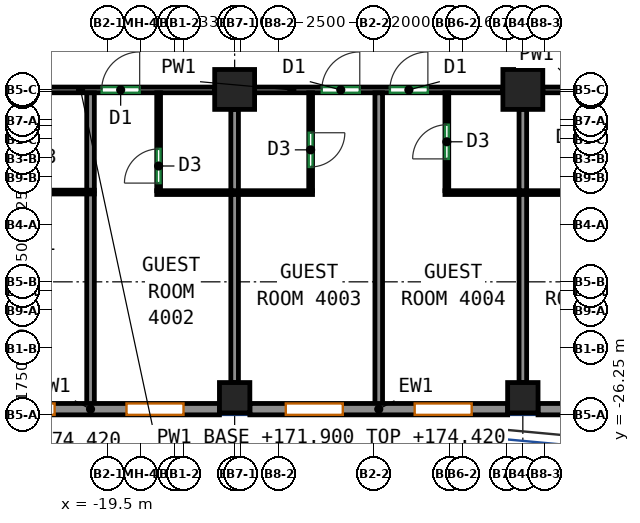
"""IFC4 building model, lengths in metres.
Left out: names, types, materials, properties, quantities, classifications, styles, units other than length and angle.
Written with IfcOpenShell. Run it as: python <this file> out.ifc"""

import sys

from ifc_helpers import new_model, si_unit, direction, frame, frame_2d, origin, origin_2d, place, context, subcontext, project, spatial, rectangle, extrude, source, transform, mapped, element, fill, save


model = new_model("IFC4")
c1 = context("Model", 3, precision=1e-05, world=origin(), true_north=direction((0.0, 1.0)))
c2 = subcontext(c1, "Body", "Model", "MODEL_VIEW")
j1 = project(units=[si_unit("LENGTHUNIT", "METRE"), si_unit("PLANEANGLEUNIT", "RADIAN")], contexts=[c1])
p1 = place(None, origin())
s1 = spatial("IfcSite", under=j1, at=p1, CompositionType="ELEMENT")
p2 = place(p1, origin())
s2 = spatial("IfcBuilding", under=s1, at=p2, CompositionType="ELEMENT")
p3 = place(p2, frame((0.0, 0.0, 171.9)))
s3 = spatial("IfcBuildingStorey", under=s2, at=p3, CompositionType="ELEMENT", Elevation=171.9)
m1 = source(origin(), c2, "Body", "SweptSolid", [
    extrude(rectangle(XDim=0.8, YDim=0.8, at=origin_2d()), origin(), (0.0, 0.0, 1.0), 3.12),
])
p4 = place(p3, frame((-16.167, -25.8, 0.0), z_axis=(0.0, 0.0, 1.0), x_axis=(1.0, 0.0, 0.0)))
e1 = element("IfcColumn", 1, at=p4, inside=s3, PredefinedType="COLUMN", context=c2, shape_type="MappedRepresentation", body=[
    mapped(m1, transform((0.0, 0.0, 0.0))),
])
m2 = source(origin(), c2, "Body", "SweptSolid", [
    extrude(rectangle(XDim=1.05, YDim=1.05, at=origin_2d()), origin(), (0.0, 0.0, 1.0), 3.12),
])
p5 = place(p3, frame((-16.167, -17.688, 0.0), z_axis=(0.0, 0.0, 1.0), x_axis=(1.0, 0.0, 0.0)))
e2 = element("IfcColumn", 2, at=p5, inside=s3, PredefinedType="COLUMN", context=c2, shape_type="MappedRepresentation", body=[
    mapped(m2, transform((0.0, 0.0, 0.0))),
])
p6 = place(p3, frame((-8.583, -25.8, 0.0), z_axis=(0.0, 0.0, 1.0), x_axis=(1.0, 0.0, 0.0)))
e3 = element("IfcColumn", 3, at=p6, inside=s3, PredefinedType="COLUMN", context=c2, shape_type="MappedRepresentation", body=[
    mapped(m1, transform((0.0, 0.0, 0.0))),
])
p7 = place(p3, frame((-8.583, -17.688, 0.0), z_axis=(0.0, 0.0, 1.0), x_axis=(1.0, 0.0, 0.0)))
e4 = element("IfcColumn", 4, at=p7, inside=s3, PredefinedType="COLUMN", context=c2, shape_type="MappedRepresentation", body=[
    mapped(m2, transform((0.0, 0.0, 0.0))),
])
m3 = source(origin(), c2, "Body", "SweptSolid", [
    extrude(rectangle(XDim=6.783, YDim=0.3, at=frame_2d((3.392, 0.0))), origin(), (0.0, 0.0, 1.0), 3.12),
])
p8 = place(p3, frame((-23.35, -26.1, 0.0), z_axis=(0.0, 0.0, 1.0), x_axis=(1.0, 0.0, 0.0)))
e5 = element("IfcWall", 5, at=p8, inside=s3, PredefinedType="SOLIDWALL", context=c2, shape_type="MappedRepresentation", body=[
    mapped(m3, transform((0.0, 0.0, 0.0))),
])
p9 = place(p8, frame((0.946, 0.0, 0.85)))
e6 = element("IfcOpeningElement", 6, at=p9, cuts=e5, PredefinedType="OPENING", context=c2, shape_type="SweptSolid", body=[
    extrude(rectangle(XDim=1.5, YDim=1.95, at=frame_2d((0.75, 0.975))), frame((0.0, 0.16, 0.0), z_axis=(0.0, -1.0, 0.0), x_axis=(1.0, 0.0, 0.0)), (0.0, 0.0, 1.0), 0.32),
])
p10 = place(p8, frame((4.337, 0.0, 0.85)))
e7 = element("IfcOpeningElement", 7, at=p10, cuts=e5, PredefinedType="OPENING", context=c2, shape_type="SweptSolid", body=[
    extrude(rectangle(XDim=1.5, YDim=1.95, at=frame_2d((0.75, 0.975))), frame((0.0, 0.16, 0.0), z_axis=(0.0, -1.0, 0.0), x_axis=(1.0, 0.0, 0.0)), (0.0, 0.0, 1.0), 0.32),
])
m4 = source(origin(), c2, "Body", "SweptSolid", [
    extrude(rectangle(XDim=6.783, YDim=0.3, at=frame_2d((3.392, 0.0))), origin(), (0.0, 0.0, 1.0), 3.12),
])
p11 = place(p3, frame((-15.767, -26.1, 0.0), z_axis=(0.0, 0.0, 1.0), x_axis=(1.0, 0.0, 0.0)))
e8 = element("IfcWall", 8, at=p11, inside=s3, PredefinedType="SOLIDWALL", context=c2, shape_type="MappedRepresentation", body=[
    mapped(m4, transform((0.0, 0.0, 0.0))),
])
p12 = place(p11, frame((0.946, 0.0, 0.85)))
e9 = element("IfcOpeningElement", 9, at=p12, cuts=e8, PredefinedType="OPENING", context=c2, shape_type="SweptSolid", body=[
    extrude(rectangle(XDim=1.5, YDim=1.95, at=frame_2d((0.75, 0.975))), frame((0.0, 0.16, 0.0), z_axis=(0.0, -1.0, 0.0), x_axis=(1.0, 0.0, 0.0)), (0.0, 0.0, 1.0), 0.32),
])
p13 = place(p11, frame((4.338, 0.0, 0.85)))
e10 = element("IfcOpeningElement", 10, at=p13, cuts=e8, PredefinedType="OPENING", context=c2, shape_type="SweptSolid", body=[
    extrude(rectangle(XDim=1.5, YDim=1.95, at=frame_2d((0.75, 0.975))), frame((0.0, 0.16, 0.0), z_axis=(0.0, -1.0, 0.0), x_axis=(1.0, 0.0, 0.0)), (0.0, 0.0, 1.0), 0.32),
])
p14 = place(p3, frame((-8.183, -26.1, 0.0), z_axis=(0.0, 0.0, 1.0), x_axis=(1.0, 0.0, 0.0)))
e11 = element("IfcWall", 11, at=p14, inside=s3, PredefinedType="SOLIDWALL", context=c2, shape_type="MappedRepresentation", body=[
    mapped(m3, transform((0.0, 0.0, 0.0))),
])
p15 = place(p14, frame((0.946, 0.0, 0.85)))
e12 = element("IfcOpeningElement", 12, at=p15, cuts=e11, PredefinedType="OPENING", context=c2, shape_type="SweptSolid", body=[
    extrude(rectangle(XDim=1.5, YDim=1.95, at=frame_2d((0.75, 0.975))), frame((0.0, 0.16, 0.0), z_axis=(0.0, -1.0, 0.0), x_axis=(1.0, 0.0, 0.0)), (0.0, 0.0, 1.0), 0.32),
])
p16 = place(p14, frame((4.337, 0.0, 0.85)))
e13 = element("IfcOpeningElement", 13, at=p16, cuts=e11, PredefinedType="OPENING", context=c2, shape_type="SweptSolid", body=[
    extrude(rectangle(XDim=1.5, YDim=1.95, at=frame_2d((0.75, 0.975))), frame((0.0, 0.16, 0.0), z_axis=(0.0, -1.0, 0.0), x_axis=(1.0, 0.0, 0.0)), (0.0, 0.0, 1.0), 0.32),
])
p17 = place(p3, frame((-23.75, -17.7, 0.0), z_axis=(0.0, 0.0, 1.0), x_axis=(1.0, 0.0, 0.0)))
e14 = element("IfcWall", 14, at=p17, inside=s3, PredefinedType="PARTITIONING", context=c2, shape_type="SweptSolid", body=[
    extrude(rectangle(XDim=7.058, YDim=0.15, at=frame_2d((3.529, 0.0))), origin(), (0.0, 0.0, 1.0), 2.52),
])
p18 = place(p17, frame((0.3, 0.0, 0.0)))
e15 = element("IfcOpeningElement", 15, at=p18, cuts=e14, PredefinedType="OPENING", context=c2, shape_type="SweptSolid", body=[
    extrude(rectangle(XDim=1.0, YDim=2.1, at=frame_2d((0.5, 1.05))), frame((0.0, 0.085, 0.0), z_axis=(0.0, -1.0, 0.0), x_axis=(1.0, 0.0, 0.0)), (0.0, 0.0, 1.0), 0.17),
])
p19 = place(p17, frame((4.084, 0.0, 0.0)))
e16 = element("IfcOpeningElement", 16, at=p19, cuts=e14, PredefinedType="OPENING", context=c2, shape_type="SweptSolid", body=[
    extrude(rectangle(XDim=1.0, YDim=2.1, at=frame_2d((0.5, 1.05))), frame((0.0, 0.085, 0.0), z_axis=(0.0, -1.0, 0.0), x_axis=(1.0, 0.0, 0.0)), (0.0, 0.0, 1.0), 0.17),
])
p20 = place(p3, frame((-15.642, -17.7, 0.0), z_axis=(0.0, 0.0, 1.0), x_axis=(1.0, 0.0, 0.0)))
e17 = element("IfcWall", 17, at=p20, inside=s3, PredefinedType="PARTITIONING", context=c2, shape_type="SweptSolid", body=[
    extrude(rectangle(XDim=6.534, YDim=0.15, at=frame_2d((3.267, 0.0))), origin(), (0.0, 0.0, 1.0), 3.12),
])
p21 = place(p20, frame((1.768, 0.0, 0.0)))
e18 = element("IfcOpeningElement", 18, at=p21, cuts=e17, PredefinedType="OPENING", context=c2, shape_type="SweptSolid", body=[
    extrude(rectangle(XDim=1.0, YDim=2.1, at=frame_2d((0.5, 1.05))), frame((0.0, 0.085, 0.0), z_axis=(0.0, -1.0, 0.0), x_axis=(1.0, 0.0, 0.0)), (0.0, 0.0, 1.0), 0.17),
])
p22 = place(p20, frame((3.56, 0.0, 0.0)))
e19 = element("IfcOpeningElement", 19, at=p22, cuts=e17, PredefinedType="OPENING", context=c2, shape_type="SweptSolid", body=[
    extrude(rectangle(XDim=1.0, YDim=2.1, at=frame_2d((0.5, 1.05))), frame((0.0, 0.085, 0.0), z_axis=(0.0, -1.0, 0.0), x_axis=(1.0, 0.0, 0.0)), (0.0, 0.0, 1.0), 0.17),
])
p23 = place(p3, frame((-8.058, -17.7, 0.0), z_axis=(0.0, 0.0, 1.0), x_axis=(1.0, 0.0, 0.0)))
e20 = element("IfcWall", 20, at=p23, inside=s3, PredefinedType="PARTITIONING", context=c2, shape_type="SweptSolid", body=[
    extrude(rectangle(XDim=6.533, YDim=0.15, at=frame_2d((3.267, 0.0))), origin(), (0.0, 0.0, 1.0), 3.12),
])
p24 = place(p23, frame((1.973, 0.0, 0.0)))
e21 = element("IfcOpeningElement", 21, at=p24, cuts=e20, PredefinedType="OPENING", context=c2, shape_type="SweptSolid", body=[
    extrude(rectangle(XDim=1.0, YDim=2.1, at=frame_2d((0.5, 1.05))), frame((0.0, 0.085, 0.0), z_axis=(0.0, -1.0, 0.0), x_axis=(1.0, 0.0, 0.0)), (0.0, 0.0, 1.0), 0.17),
])
p25 = place(p23, frame((3.868, 0.0, 0.0)))
e22 = element("IfcOpeningElement", 22, at=p25, cuts=e20, PredefinedType="OPENING", context=c2, shape_type="SweptSolid", body=[
    extrude(rectangle(XDim=1.0, YDim=2.1, at=frame_2d((0.5, 1.05))), frame((0.0, 0.085, 0.0), z_axis=(0.0, -1.0, 0.0), x_axis=(1.0, 0.0, 0.0)), (0.0, 0.0, 1.0), 0.17),
])
p26 = place(p3, frame((-22.009, -20.388, 0.0), z_axis=(0.0, 0.0, 1.0), x_axis=(1.0, 0.0, 0.0)))
e23 = element("IfcWall", 23, at=p26, inside=s3, PredefinedType="PARTITIONING", context=c2, shape_type="SweptSolid", body=[
    extrude(rectangle(XDim=2.15, YDim=0.1, at=frame_2d((1.075, 0.0))), origin(), (0.0, 0.0, 1.0), 3.12),
])
p27 = place(p3, frame((-19.959, -26.0, 0.0), z_axis=(0.0, 0.0, 1.0), x_axis=(0.0, 1.0, 0.0)))
e24 = element("IfcWall", 24, at=p27, inside=s3, PredefinedType="PARTITIONING", context=c2, shape_type="SweptSolid", body=[
    extrude(rectangle(XDim=5.562, YDim=0.2, at=frame_2d((2.781, 0.0))), origin(), (0.0, 0.0, 1.0), 3.12),
])
p28 = place(p3, frame((-19.959, -20.338, 0.0), z_axis=(0.0, 0.0, 1.0), x_axis=(0.0, 1.0, 0.0)))
e25 = element("IfcWall", 25, at=p28, inside=s3, PredefinedType="PARTITIONING", context=c2, shape_type="SweptSolid", body=[
    extrude(rectangle(XDim=2.561, YDim=0.2, at=frame_2d((1.28, 0.0))), origin(), (0.0, 0.0, 1.0), 3.12),
])
p29 = place(p3, frame((-18.167, -20.352, 0.0), z_axis=(0.0, 0.0, 1.0), x_axis=(0.0, 1.0, 0.0)))
e26 = element("IfcWall", 26, at=p29, inside=s3, PredefinedType="PARTITIONING", context=c2, shape_type="SweptSolid", body=[
    extrude(rectangle(XDim=2.575, YDim=0.1, at=frame_2d((1.288, 0.0))), origin(), (0.0, 0.0, 1.0), 3.12),
])
p30 = place(p29, frame((0.2, 0.0, 0.0)))
e27 = element("IfcOpeningElement", 27, at=p30, cuts=e26, PredefinedType="OPENING", context=c2, shape_type="SweptSolid", body=[
    extrude(rectangle(XDim=0.9, YDim=2.1, at=frame_2d((0.45, 1.05))), frame((0.0, 0.06, 0.0), z_axis=(0.0, -1.0, 0.0), x_axis=(1.0, 0.0, 0.0)), (0.0, 0.0, 1.0), 0.12),
])
p31 = place(p3, frame((-18.217, -20.402, 0.0), z_axis=(0.0, 0.0, 1.0), x_axis=(1.0, 0.0, 0.0)))
e28 = element("IfcWall", 28, at=p31, inside=s3, PredefinedType="PARTITIONING", context=c2, shape_type="SweptSolid", body=[
    extrude(rectangle(XDim=4.1, YDim=0.1, at=frame_2d((2.05, 0.0))), origin(), (0.0, 0.0, 1.0), 3.12),
])
p32 = place(p3, frame((-16.167, -25.4, 0.0), z_axis=(0.0, 0.0, 1.0), x_axis=(0.0, 1.0, 0.0)))
e29 = element("IfcWall", 29, at=p32, inside=s3, PredefinedType="PARTITIONING", context=c2, shape_type="SweptSolid", body=[
    extrude(rectangle(XDim=4.948, YDim=0.2, at=frame_2d((2.474, 0.0))), origin(), (0.0, 0.0, 1.0), 3.12),
])
p33 = place(p3, frame((-16.167, -20.352, 0.0), z_axis=(0.0, 0.0, 1.0), x_axis=(0.0, 1.0, 0.0)))
e30 = element("IfcWall", 30, at=p33, inside=s3, PredefinedType="PARTITIONING", context=c2, shape_type="SweptSolid", body=[
    extrude(rectangle(XDim=2.14, YDim=0.2, at=frame_2d((1.07, 0.0))), origin(), (0.0, 0.0, 1.0), 3.12),
])
p34 = place(p3, frame((-14.167, -17.777, 0.0), z_axis=(0.0, 0.0, 1.0), x_axis=(0.0, -1.0, 0.0)))
e31 = element("IfcWall", 31, at=p34, inside=s3, PredefinedType="PARTITIONING", context=c2, shape_type="SweptSolid", body=[
    extrude(rectangle(XDim=2.575, YDim=0.1, at=frame_2d((1.288, 0.0))), origin(), (0.0, 0.0, 1.0), 3.12),
])
p35 = place(p34, frame((1.05, 0.0, 0.0)))
e32 = element("IfcOpeningElement", 32, at=p35, cuts=e31, PredefinedType="OPENING", context=c2, shape_type="SweptSolid", body=[
    extrude(rectangle(XDim=0.9, YDim=2.1, at=frame_2d((0.45, 1.05))), frame((0.0, 0.06, 0.0), z_axis=(0.0, -1.0, 0.0), x_axis=(1.0, 0.0, 0.0)), (0.0, 0.0, 1.0), 0.12),
])
p36 = place(p3, frame((-12.375, -26.0, 0.0), z_axis=(0.0, 0.0, 1.0), x_axis=(0.0, 1.0, 0.0)))
e33 = element("IfcWall", 33, at=p36, inside=s3, PredefinedType="PARTITIONING", context=c2, shape_type="SweptSolid", body=[
    extrude(rectangle(XDim=8.223, YDim=0.2, at=frame_2d((4.111, 0.0))), origin(), (0.0, 0.0, 1.0), 3.12),
])
p37 = place(p3, frame((-10.583, -20.352, 0.0), z_axis=(0.0, 0.0, 1.0), x_axis=(0.0, 1.0, 0.0)))
e34 = element("IfcWall", 34, at=p37, inside=s3, PredefinedType="PARTITIONING", context=c2, shape_type="SweptSolid", body=[
    extrude(rectangle(XDim=2.575, YDim=0.1, at=frame_2d((1.288, 0.0))), origin(), (0.0, 0.0, 1.0), 3.12),
])
p38 = place(p37, frame((0.837, 0.0, 0.0)))
e35 = element("IfcOpeningElement", 35, at=p38, cuts=e34, PredefinedType="OPENING", context=c2, shape_type="SweptSolid", body=[
    extrude(rectangle(XDim=0.9, YDim=2.1, at=frame_2d((0.45, 1.05))), frame((0.0, 0.06, 0.0), z_axis=(0.0, -1.0, 0.0), x_axis=(1.0, 0.0, 0.0)), (0.0, 0.0, 1.0), 0.12),
])
p39 = place(p3, frame((-10.633, -20.402, 0.0), z_axis=(0.0, 0.0, 1.0), x_axis=(1.0, 0.0, 0.0)))
e36 = element("IfcWall", 36, at=p39, inside=s3, PredefinedType="PARTITIONING", context=c2, shape_type="SweptSolid", body=[
    extrude(rectangle(XDim=4.1, YDim=0.1, at=frame_2d((2.05, 0.0))), origin(), (0.0, 0.0, 1.0), 3.12),
])
p40 = place(p3, frame((-8.583, -25.4, 0.0), z_axis=(0.0, 0.0, 1.0), x_axis=(0.0, 1.0, 0.0)))
e37 = element("IfcWall", 37, at=p40, inside=s3, PredefinedType="PARTITIONING", context=c2, shape_type="SweptSolid", body=[
    extrude(rectangle(XDim=4.948, YDim=0.2, at=frame_2d((2.474, 0.0))), origin(), (0.0, 0.0, 1.0), 3.12),
])
p41 = place(p3, frame((-8.583, -20.352, 0.0), z_axis=(0.0, 0.0, 1.0), x_axis=(0.0, 1.0, 0.0)))
e38 = element("IfcWall", 38, at=p41, inside=s3, PredefinedType="PARTITIONING", context=c2, shape_type="SweptSolid", body=[
    extrude(rectangle(XDim=2.14, YDim=0.2, at=frame_2d((1.07, 0.0))), origin(), (0.0, 0.0, 1.0), 3.12),
])
p42 = place(p9, origin())
e39 = element("IfcWindow", 39, at=p42, inside=s3, PartitioningType="SINGLE_PANEL", PredefinedType="WINDOW", context=c2, shape_type="SweptSolid", body=[
    extrude(rectangle(XDim=1.5, YDim=1.95, at=frame_2d((0.75, 0.975))), frame((0.0, 0.03, 0.0), z_axis=(0.0, -1.0, 0.0), x_axis=(1.0, 0.0, 0.0)), (0.0, 0.0, 1.0), 0.06),
])
fill(e6, e39)
p43 = place(p10, origin())
e40 = element("IfcWindow", 40, at=p43, inside=s3, PartitioningType="SINGLE_PANEL", PredefinedType="WINDOW", context=c2, shape_type="SweptSolid", body=[
    extrude(rectangle(XDim=1.5, YDim=1.95, at=frame_2d((0.75, 0.975))), frame((0.0, 0.03, 0.0), z_axis=(0.0, -1.0, 0.0), x_axis=(1.0, 0.0, 0.0)), (0.0, 0.0, 1.0), 0.06),
])
fill(e7, e40)
p44 = place(p12, origin())
e41 = element("IfcWindow", 41, at=p44, inside=s3, PartitioningType="SINGLE_PANEL", PredefinedType="WINDOW", context=c2, shape_type="SweptSolid", body=[
    extrude(rectangle(XDim=1.5, YDim=1.95, at=frame_2d((0.75, 0.975))), frame((0.0, 0.03, 0.0), z_axis=(0.0, -1.0, 0.0), x_axis=(1.0, 0.0, 0.0)), (0.0, 0.0, 1.0), 0.06),
])
fill(e9, e41)
p45 = place(p13, origin())
e42 = element("IfcWindow", 42, at=p45, inside=s3, PartitioningType="SINGLE_PANEL", PredefinedType="WINDOW", context=c2, shape_type="SweptSolid", body=[
    extrude(rectangle(XDim=1.5, YDim=1.95, at=frame_2d((0.75, 0.975))), frame((0.0, 0.03, 0.0), z_axis=(0.0, -1.0, 0.0), x_axis=(1.0, 0.0, 0.0)), (0.0, 0.0, 1.0), 0.06),
])
fill(e10, e42)
p46 = place(p30, origin())
e43 = element("IfcDoor", 43, at=p46, inside=s3, OperationType="SINGLE_SWING_LEFT", PredefinedType="DOOR", context=c2, shape_type="SweptSolid", body=[
    extrude(rectangle(XDim=0.9, YDim=2.1, at=frame_2d((0.45, 1.05))), frame((0.0, 0.025, 0.0), z_axis=(0.0, -1.0, 0.0), x_axis=(1.0, 0.0, 0.0)), (0.0, 0.0, 1.0), 0.05),
])
fill(e27, e43)
p47 = place(p35, origin())
e44 = element("IfcDoor", 44, at=p47, inside=s3, OperationType="SINGLE_SWING_LEFT", PredefinedType="DOOR", context=c2, shape_type="SweptSolid", body=[
    extrude(rectangle(XDim=0.9, YDim=2.1, at=frame_2d((0.45, 1.05))), frame((0.0, 0.025, 0.0), z_axis=(0.0, -1.0, 0.0), x_axis=(1.0, 0.0, 0.0)), (0.0, 0.0, 1.0), 0.05),
])
fill(e32, e44)
p48 = place(p38, origin())
e45 = element("IfcDoor", 45, at=p48, inside=s3, OperationType="SINGLE_SWING_LEFT", PredefinedType="DOOR", context=c2, shape_type="SweptSolid", body=[
    extrude(rectangle(XDim=0.9, YDim=2.1, at=frame_2d((0.45, 1.05))), frame((0.0, 0.025, 0.0), z_axis=(0.0, -1.0, 0.0), x_axis=(1.0, 0.0, 0.0)), (0.0, 0.0, 1.0), 0.05),
])
fill(e35, e45)
p49 = place(p19, origin())
e46 = element("IfcDoor", 46, at=p49, inside=s3, OperationType="SINGLE_SWING_RIGHT", PredefinedType="DOOR", context=c2, shape_type="SweptSolid", body=[
    extrude(rectangle(XDim=1.0, YDim=2.1, at=frame_2d((0.5, 1.05))), frame((0.0, 0.025, 0.0), z_axis=(0.0, -1.0, 0.0), x_axis=(1.0, 0.0, 0.0)), (0.0, 0.0, 1.0), 0.05),
])
fill(e16, e46)
p50 = place(p21, origin())
e47 = element("IfcDoor", 47, at=p50, inside=s3, OperationType="SINGLE_SWING_RIGHT", PredefinedType="DOOR", context=c2, shape_type="SweptSolid", body=[
    extrude(rectangle(XDim=1.0, YDim=2.1, at=frame_2d((0.5, 1.05))), frame((0.0, 0.025, 0.0), z_axis=(0.0, -1.0, 0.0), x_axis=(1.0, 0.0, 0.0)), (0.0, 0.0, 1.0), 0.05),
])
fill(e18, e47)
p51 = place(p22, origin())
e48 = element("IfcDoor", 48, at=p51, inside=s3, OperationType="SINGLE_SWING_RIGHT", PredefinedType="DOOR", context=c2, shape_type="SweptSolid", body=[
    extrude(rectangle(XDim=1.0, YDim=2.1, at=frame_2d((0.5, 1.05))), frame((0.0, 0.025, 0.0), z_axis=(0.0, -1.0, 0.0), x_axis=(1.0, 0.0, 0.0)), (0.0, 0.0, 1.0), 0.05),
])
fill(e19, e48)
save(model, sys.argv[1])
